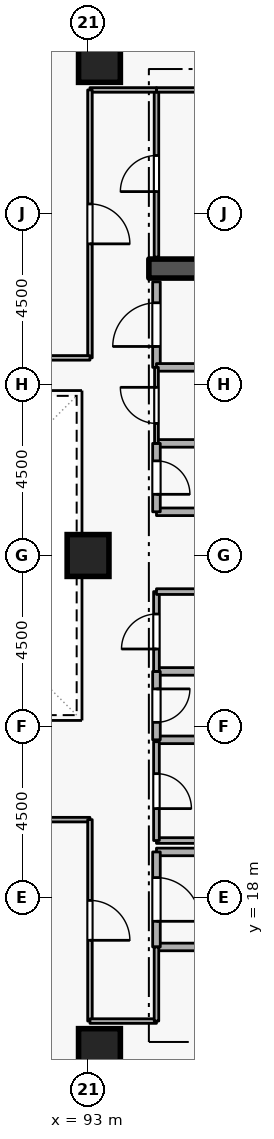
"""IFC4 building model, lengths in metres.
Left out: names, types, materials, properties, quantities, classifications, styles, units other than length and angle.
Written with IfcOpenShell. Run it as: python <this file> out.ifc"""

import sys

from ifc_helpers import new_model, si_unit, direction, frame, frame_2d, origin, origin_2d, place, context, subcontext, project, spatial, rectangle, extrude, element, fill, save


model = new_model("IFC4")
c1 = context("Model", 3, precision=1e-05, world=origin(), true_north=direction((0.0, 1.0)))
c2 = subcontext(c1, "Body", "Model", "MODEL_VIEW")
j1 = project(units=[si_unit("LENGTHUNIT", "METRE"), si_unit("PLANEANGLEUNIT", "RADIAN")], contexts=[c1])
p1 = place(None, origin())
s1 = spatial("IfcSite", under=j1, at=p1, CompositionType="ELEMENT")
p2 = place(p1, origin())
s2 = spatial("IfcBuilding", under=s1, at=p2, CompositionType="ELEMENT")
p3 = place(p2, frame((0.0, 0.0, 178.5)))
s3 = spatial("IfcBuildingStorey", under=s2, at=p3, CompositionType="ELEMENT", Elevation=178.5)
p4 = place(p3, frame((94.6, 34.55, 0.0), z_axis=(0.0, 0.0, 1.0), x_axis=(1.0, 0.0, 0.0)))
e1 = element("IfcWall", 1, at=p4, inside=s3, PredefinedType="SHEAR", context=c2, shape_type="SweptSolid", body=[
    extrude(rectangle(XDim=5.8, YDim=0.5, at=frame_2d((2.9, 0.0))), origin(), (0.0, 0.0, 1.0), 3.6),
])
for number, where, z_axis, x_axis in (
    (2, (93.3, 14.0, 0.0), (0.0, 0.0, 1.0), (1.0, 0.0, 0.0)),
    (3, (93.3, 40.0, 0.0), (0.0, 0.0, 1.0), (1.0, 0.0, 0.0)),
    (4, (93.0, 27.0, 0.0), (0.0, 0.0, 1.0), (1.0, 0.0, 0.0)),
):
    element("IfcColumn", number, at=place(p3, frame(where, z_axis=z_axis, x_axis=x_axis)), inside=s3, PredefinedType="COLUMN", context=c2, shape_type="SweptSolid", body=[
        extrude(rectangle(XDim=1.1, YDim=1.1, at=origin_2d()), origin(), (0.0, 0.0, 1.0), 3.6),
    ])
p5 = place(p3, frame((94.8, 16.7, 0.0), z_axis=(0.0, 0.0, 1.0), x_axis=(1.0, 0.0, 0.0)))
e5 = element("IfcWall", 5, at=p5, inside=s3, PredefinedType="STANDARD", context=c2, shape_type="SweptSolid", body=[
    extrude(rectangle(XDim=5.7, YDim=0.2, at=frame_2d((2.85, 0.0))), origin(), (0.0, 0.0, 1.0), 3.34),
])
p6 = place(p3, frame((97.1, 19.2, 0.0), z_axis=(0.0, 0.0, 1.0), x_axis=(-1.0, 0.0, 0.0)))
e6 = element("IfcWall", 6, at=p6, inside=s3, PredefinedType="STANDARD", context=c2, shape_type="SweptSolid", body=[
    extrude(rectangle(XDim=2.3, YDim=0.2, at=frame_2d((1.15, 0.0))), origin(), (0.0, 0.0, 1.0), 2.545),
])
p7 = place(p3, frame((94.8, 19.2, 0.0), z_axis=(0.0, 0.0, 1.0), x_axis=(0.0, -1.0, 0.0)))
e7 = element("IfcWall", 7, at=p7, inside=s3, PredefinedType="STANDARD", context=c2, shape_type="SweptSolid", body=[
    extrude(rectangle(XDim=2.5, YDim=0.2, at=frame_2d((1.25, 0.0))), origin(), (0.0, 0.0, 1.0), 3.34),
])
p8 = place(p7, frame((0.675, 0.0, 0.0)))
e8 = element("IfcOpeningElement", 8, at=p8, cuts=e7, PredefinedType="OPENING", context=c2, shape_type="SweptSolid", body=[
    extrude(rectangle(XDim=1.15, YDim=2.1, at=frame_2d((0.575, 1.05))), frame((0.0, 0.11, 0.0), z_axis=(0.0, -1.0, 0.0), x_axis=(1.0, 0.0, 0.0)), (0.0, 0.0, 1.0), 0.22),
])
for number, where, z_axis, x_axis in (
    (9, (94.8, 28.15, 0.0), (0.0, 0.0, 1.0), (1.0, 0.0, 0.0)),
    (10, (96.85, 29.95, 0.0), (0.0, 0.0, 1.0), (-1.0, 0.0, 0.0)),
):
    element("IfcWall", number, at=place(p3, frame(where, z_axis=z_axis, x_axis=x_axis)), inside=s3, PredefinedType="STANDARD", context=c2, shape_type="SweptSolid", body=[
        extrude(rectangle(XDim=2.05, YDim=0.2, at=frame_2d((1.025, 0.0))), origin(), (0.0, 0.0, 1.0), 3.34),
    ])
p9 = place(p3, frame((94.8, 29.95, 0.0), z_axis=(0.0, 0.0, 1.0), x_axis=(0.0, -1.0, 0.0)))
e11 = element("IfcWall", 11, at=p9, inside=s3, PredefinedType="STANDARD", context=c2, shape_type="SweptSolid", body=[
    extrude(rectangle(XDim=1.8, YDim=0.2, at=frame_2d((0.9, 0.0))), origin(), (0.0, 0.0, 1.0), 3.34),
])
p10 = place(p9, frame((0.46, 0.0, 0.0)))
e12 = element("IfcOpeningElement", 12, at=p10, cuts=e11, PredefinedType="OPENING", context=c2, shape_type="SweptSolid", body=[
    extrude(rectangle(XDim=0.88, YDim=2.04, at=frame_2d((0.44, 1.02))), frame((0.0, 0.11, 0.0), z_axis=(0.0, -1.0, 0.0), x_axis=(1.0, 0.0, 0.0)), (0.0, 0.0, 1.0), 0.22),
])
for number, where, z_axis, x_axis in (
    (13, (94.8, 22.15, 0.0), (0.0, 0.0, 1.0), (1.0, 0.0, 0.0)),
    (14, (96.85, 23.95, 0.0), (0.0, 0.0, 1.0), (-1.0, 0.0, 0.0)),
):
    element("IfcWall", number, at=place(p3, frame(where, z_axis=z_axis, x_axis=x_axis)), inside=s3, PredefinedType="STANDARD", context=c2, shape_type="SweptSolid", body=[
        extrude(rectangle(XDim=2.05, YDim=0.2, at=frame_2d((1.025, 0.0))), origin(), (0.0, 0.0, 1.0), 3.34),
    ])
p11 = place(p3, frame((94.8, 23.95, 0.0), z_axis=(0.0, 0.0, 1.0), x_axis=(0.0, -1.0, 0.0)))
e15 = element("IfcWall", 15, at=p11, inside=s3, PredefinedType="STANDARD", context=c2, shape_type="SweptSolid", body=[
    extrude(rectangle(XDim=1.8, YDim=0.2, at=frame_2d((0.9, 0.0))), origin(), (0.0, 0.0, 1.0), 3.34),
])
p12 = place(p11, frame((0.46, 0.0, 0.0)))
e16 = element("IfcOpeningElement", 16, at=p12, cuts=e15, PredefinedType="OPENING", context=c2, shape_type="SweptSolid", body=[
    extrude(rectangle(XDim=0.88, YDim=2.04, at=frame_2d((0.44, 1.02))), frame((0.0, 0.11, 0.0), z_axis=(0.0, -1.0, 0.0), x_axis=(1.0, 0.0, 0.0)), (0.0, 0.0, 1.0), 0.22),
])
p13 = place(p3, frame((94.8, 31.95, 0.0), z_axis=(0.0, 0.0, 1.0), x_axis=(0.0, 1.0, 0.0)))
e17 = element("IfcWall", 17, at=p13, inside=s3, PredefinedType="STANDARD", context=c2, shape_type="SweptSolid", body=[
    extrude(rectangle(XDim=2.25, YDim=0.2, at=frame_2d((1.125, 0.0))), origin(), (0.0, 0.0, 1.0), 3.34),
])
p14 = place(p13, frame((0.55, 0.0, 0.0)))
e18 = element("IfcOpeningElement", 18, at=p14, cuts=e17, PredefinedType="OPENING", context=c2, shape_type="SweptSolid", body=[
    extrude(rectangle(XDim=1.15, YDim=2.1, at=frame_2d((0.575, 1.05))), frame((0.0, 0.11, 0.0), z_axis=(0.0, -1.0, 0.0), x_axis=(1.0, 0.0, 0.0)), (0.0, 0.0, 1.0), 0.22),
])
p15 = place(p3, frame((96.85, 31.95, 0.0), z_axis=(0.0, 0.0, 1.0), x_axis=(-1.0, 0.0, 0.0)))
e19 = element("IfcWall", 19, at=p15, inside=s3, PredefinedType="STANDARD", context=c2, shape_type="SweptSolid", body=[
    extrude(rectangle(XDim=2.05, YDim=0.2, at=frame_2d((1.025, 0.0))), origin(), (0.0, 0.0, 1.0), 3.34),
])
p16 = place(p3, frame((94.8, 19.5, 0.0), z_axis=(0.0, 0.0, 1.0), x_axis=(1.0, 0.0, 0.0)))
e20 = element("IfcWall", 20, at=p16, inside=s3, PredefinedType="PARTITIONING", context=c2, shape_type="SweptSolid", body=[
    extrude(rectangle(XDim=2.05, YDim=0.15, at=frame_2d((1.025, 0.0))), origin(), (0.0, 0.0, 1.0), 2.545),
])
p17 = place(p3, frame((94.8, 22.1, 0.0), z_axis=(0.0, 0.0, 1.0), x_axis=(0.0, -1.0, 0.0)))
e21 = element("IfcWall", 21, at=p17, inside=s3, PredefinedType="PARTITIONING", context=c2, shape_type="SweptSolid", body=[
    extrude(rectangle(XDim=2.6, YDim=0.15, at=frame_2d((1.3, 0.0))), origin(), (0.0, 0.0, 1.0), 3.34),
])
p18 = place(p17, frame((0.84, 0.0, 0.0)))
e22 = element("IfcOpeningElement", 22, at=p18, cuts=e21, PredefinedType="OPENING", context=c2, shape_type="SweptSolid", body=[
    extrude(rectangle(XDim=0.92, YDim=2.08, at=frame_2d((0.46, 1.04))), frame((0.0, 0.085, 0.0), z_axis=(0.0, -1.0, 0.0), x_axis=(1.0, 0.0, 0.0)), (0.0, 0.0, 1.0), 0.17),
])
p19 = place(p3, frame((94.8, 23.95, 0.0), z_axis=(0.0, 0.0, 1.0), x_axis=(0.0, 1.0, 0.0)))
e23 = element("IfcWall", 23, at=p19, inside=s3, PredefinedType="PARTITIONING", context=c2, shape_type="SweptSolid", body=[
    extrude(rectangle(XDim=2.1, YDim=0.15, at=frame_2d((1.05, 0.0))), origin(), (0.0, 0.0, 1.0), 3.34),
])
p20 = place(p19, frame((0.59, 0.0, 0.0)))
e24 = element("IfcOpeningElement", 24, at=p20, cuts=e23, PredefinedType="OPENING", context=c2, shape_type="SweptSolid", body=[
    extrude(rectangle(XDim=0.92, YDim=2.08, at=frame_2d((0.46, 1.04))), frame((0.0, 0.085, 0.0), z_axis=(0.0, -1.0, 0.0), x_axis=(1.0, 0.0, 0.0)), (0.0, 0.0, 1.0), 0.17),
])
p21 = place(p3, frame((94.8, 26.05, 0.0), z_axis=(0.0, 0.0, 1.0), x_axis=(1.0, 0.0, 0.0)))
e25 = element("IfcWall", 25, at=p21, inside=s3, PredefinedType="PARTITIONING", context=c2, shape_type="SweptSolid", body=[
    extrude(rectangle(XDim=2.05, YDim=0.15, at=frame_2d((1.025, 0.0))), origin(), (0.0, 0.0, 1.0), 3.34),
])
p22 = place(p3, frame((94.8, 29.95, 0.0), z_axis=(0.0, 0.0, 1.0), x_axis=(0.0, 1.0, 0.0)))
e26 = element("IfcWall", 26, at=p22, inside=s3, PredefinedType="PARTITIONING", context=c2, shape_type="SweptSolid", body=[
    extrude(rectangle(XDim=2.0, YDim=0.1, at=frame_2d((1.0, 0.0))), origin(), (0.0, 0.0, 1.0), 3.34),
])
p23 = place(p22, frame((0.525, 0.0, 0.0)))
e27 = element("IfcOpeningElement", 27, at=p23, cuts=e26, PredefinedType="OPENING", context=c2, shape_type="SweptSolid", body=[
    extrude(rectangle(XDim=0.95, YDim=2.1, at=frame_2d((0.475, 1.05))), frame((0.0, 0.06, 0.0), z_axis=(0.0, -1.0, 0.0), x_axis=(1.0, 0.0, 0.0)), (0.0, 0.0, 1.0), 0.12),
])
p24 = place(p3, frame((94.8, 34.85, 0.0), z_axis=(0.0, 0.0, 1.0), x_axis=(0.0, 1.0, 0.0)))
e28 = element("IfcWall", 28, at=p24, inside=s3, PredefinedType="PARTITIONING", context=c2, shape_type="SweptSolid", body=[
    extrude(rectangle(XDim=4.4, YDim=0.12, at=frame_2d((2.2, 0.0))), origin(), (0.0, 0.0, 1.0), 3.34),
])
p25 = place(p24, frame((1.725, 0.0, 0.0)))
e29 = element("IfcOpeningElement", 29, at=p25, cuts=e28, PredefinedType="OPENING", context=c2, shape_type="SweptSolid", body=[
    extrude(rectangle(XDim=0.95, YDim=2.1, at=frame_2d((0.475, 1.05))), frame((0.0, 0.07, 0.0), z_axis=(0.0, -1.0, 0.0), x_axis=(1.0, 0.0, 0.0)), (0.0, 0.0, 1.0), 0.14),
])
p26 = place(p3, frame((94.8, 39.25, 0.0), z_axis=(0.0, 0.0, 1.0), x_axis=(1.0, 0.0, 0.0)))
e30 = element("IfcWall", 30, at=p26, inside=s3, PredefinedType="PARTITIONING", context=c2, shape_type="SweptSolid", body=[
    extrude(rectangle(XDim=5.65, YDim=0.12, at=frame_2d((2.825, 0.0))), origin(), (0.0, 0.0, 1.0), 3.34),
])
p27 = place(p3, frame((88.5, 20.05, 0.0), z_axis=(0.0, 0.0, 1.0), x_axis=(1.0, 0.0, 0.0)))
e31 = element("IfcWall", 31, at=p27, inside=s3, PredefinedType="PARTITIONING", context=c2, shape_type="SweptSolid", body=[
    extrude(rectangle(XDim=4.55, YDim=0.12, at=frame_2d((2.275, 0.0))), origin(), (0.0, 0.0, 1.0), 3.34),
])
p28 = place(p3, frame((93.05, 20.05, 0.0), z_axis=(0.0, 0.0, 1.0), x_axis=(0.0, -1.0, 0.0)))
e32 = element("IfcWall", 32, at=p28, inside=s3, PredefinedType="PARTITIONING", context=c2, shape_type="SweptSolid", body=[
    extrude(rectangle(XDim=5.3, YDim=0.12, at=frame_2d((2.65, 0.0))), origin(), (0.0, 0.0, 1.0), 3.34),
])
p29 = place(p28, frame((2.125, 0.0, 0.0)))
e33 = element("IfcOpeningElement", 33, at=p29, cuts=e32, PredefinedType="OPENING", context=c2, shape_type="SweptSolid", body=[
    extrude(rectangle(XDim=1.05, YDim=2.1, at=frame_2d((0.525, 1.05))), frame((0.0, 0.07, 0.0), z_axis=(0.0, -1.0, 0.0), x_axis=(1.0, 0.0, 0.0)), (0.0, 0.0, 1.0), 0.14),
])
p30 = place(p3, frame((93.05, 14.75, 0.0), z_axis=(0.0, 0.0, 1.0), x_axis=(1.0, 0.0, 0.0)))
e34 = element("IfcWall", 34, at=p30, inside=s3, PredefinedType="PARTITIONING", context=c2, shape_type="SweptSolid", body=[
    extrude(rectangle(XDim=1.75, YDim=0.12, at=frame_2d((0.875, 0.0))), origin(), (0.0, 0.0, 1.0), 3.34),
])
p31 = place(p3, frame((94.8, 14.75, 0.0), z_axis=(0.0, 0.0, 1.0), x_axis=(0.0, 1.0, 0.0)))
e35 = element("IfcWall", 35, at=p31, inside=s3, PredefinedType="PARTITIONING", context=c2, shape_type="SweptSolid", body=[
    extrude(rectangle(XDim=1.95, YDim=0.12, at=frame_2d((0.975, 0.0))), origin(), (0.0, 0.0, 1.0), 3.34),
])
p32 = place(p3, frame((94.8, 39.25, 0.0), z_axis=(0.0, 0.0, 1.0), x_axis=(-1.0, 0.0, 0.0)))
e36 = element("IfcWall", 36, at=p32, inside=s3, PredefinedType="PARTITIONING", context=c2, shape_type="SweptSolid", body=[
    extrude(rectangle(XDim=1.75, YDim=0.12, at=frame_2d((0.875, 0.0))), origin(), (0.0, 0.0, 1.0), 3.34),
])
p33 = place(p3, frame((93.05, 39.25, 0.0), z_axis=(0.0, 0.0, 1.0), x_axis=(0.0, -1.0, 0.0)))
e37 = element("IfcWall", 37, at=p33, inside=s3, PredefinedType="PARTITIONING", context=c2, shape_type="SweptSolid", body=[
    extrude(rectangle(XDim=7.05, YDim=0.12, at=frame_2d((3.525, 0.0))), origin(), (0.0, 0.0, 1.0), 3.34),
])
p34 = place(p33, frame((3.0, 0.0, 0.0)))
e38 = element("IfcOpeningElement", 38, at=p34, cuts=e37, PredefinedType="OPENING", context=c2, shape_type="SweptSolid", body=[
    extrude(rectangle(XDim=1.05, YDim=2.1, at=frame_2d((0.525, 1.05))), frame((0.0, 0.07, 0.0), z_axis=(0.0, -1.0, 0.0), x_axis=(1.0, 0.0, 0.0)), (0.0, 0.0, 1.0), 0.14),
])
p35 = place(p3, frame((93.05, 32.2, 0.0), z_axis=(0.0, 0.0, 1.0), x_axis=(-1.0, 0.0, 0.0)))
e39 = element("IfcWall", 39, at=p35, inside=s3, PredefinedType="PARTITIONING", context=c2, shape_type="SweptSolid", body=[
    extrude(rectangle(XDim=4.55, YDim=0.12, at=frame_2d((2.275, 0.0))), origin(), (0.0, 0.0, 1.0), 3.34),
])
p36 = place(p8, origin())
e40 = element("IfcDoor", 40, at=p36, inside=s3, OperationType="SINGLE_SWING_RIGHT", PredefinedType="DOOR", context=c2, shape_type="SweptSolid", body=[
    extrude(rectangle(XDim=1.15, YDim=2.1, at=frame_2d((0.575, 1.05))), frame((0.0, 0.025, 0.0), z_axis=(0.0, -1.0, 0.0), x_axis=(1.0, 0.0, 0.0)), (0.0, 0.0, 1.0), 0.05),
])
fill(e8, e40)
p37 = place(p10, origin())
e41 = element("IfcDoor", 41, at=p37, inside=s3, OperationType="SINGLE_SWING_RIGHT", PredefinedType="DOOR", context=c2, shape_type="SweptSolid", body=[
    extrude(rectangle(XDim=0.88, YDim=2.04, at=frame_2d((0.44, 1.02))), frame((0.0, 0.025, 0.0), z_axis=(0.0, -1.0, 0.0), x_axis=(1.0, 0.0, 0.0)), (0.0, 0.0, 1.0), 0.05),
])
fill(e12, e41)
p38 = place(p12, origin())
e42 = element("IfcDoor", 42, at=p38, inside=s3, OperationType="SINGLE_SWING_LEFT", PredefinedType="DOOR", context=c2, shape_type="SweptSolid", body=[
    extrude(rectangle(XDim=0.88, YDim=2.04, at=frame_2d((0.44, 1.02))), frame((0.0, 0.025, 0.0), z_axis=(0.0, -1.0, 0.0), x_axis=(1.0, 0.0, 0.0)), (0.0, 0.0, 1.0), 0.05),
])
fill(e16, e42)
p39 = place(p18, origin())
e43 = element("IfcDoor", 43, at=p39, inside=s3, OperationType="SINGLE_SWING_RIGHT", PredefinedType="DOOR", context=c2, shape_type="SweptSolid", body=[
    extrude(rectangle(XDim=0.92, YDim=2.08, at=frame_2d((0.46, 1.04))), frame((0.0, 0.025, 0.0), z_axis=(0.0, -1.0, 0.0), x_axis=(1.0, 0.0, 0.0)), (0.0, 0.0, 1.0), 0.05),
])
fill(e22, e43)
p40 = place(p20, origin())
e44 = element("IfcDoor", 44, at=p40, inside=s3, OperationType="SINGLE_SWING_LEFT", PredefinedType="DOOR", context=c2, shape_type="SweptSolid", body=[
    extrude(rectangle(XDim=0.92, YDim=2.08, at=frame_2d((0.46, 1.04))), frame((0.0, 0.025, 0.0), z_axis=(0.0, -1.0, 0.0), x_axis=(1.0, 0.0, 0.0)), (0.0, 0.0, 1.0), 0.05),
])
fill(e24, e44)
p41 = place(p23, origin())
e45 = element("IfcDoor", 45, at=p41, inside=s3, OperationType="SINGLE_SWING_RIGHT", PredefinedType="DOOR", context=c2, shape_type="SweptSolid", body=[
    extrude(rectangle(XDim=0.95, YDim=2.1, at=frame_2d((0.475, 1.05))), frame((0.0, 0.025, 0.0), z_axis=(0.0, -1.0, 0.0), x_axis=(1.0, 0.0, 0.0)), (0.0, 0.0, 1.0), 0.05),
])
fill(e27, e45)
p42 = place(p14, origin())
e46 = element("IfcDoor", 46, at=p42, inside=s3, OperationType="SINGLE_SWING_LEFT", PredefinedType="DOOR", context=c2, shape_type="SweptSolid", body=[
    extrude(rectangle(XDim=1.15, YDim=2.1, at=frame_2d((0.575, 1.05))), frame((0.0, 0.025, 0.0), z_axis=(0.0, -1.0, 0.0), x_axis=(1.0, 0.0, 0.0)), (0.0, 0.0, 1.0), 0.05),
])
fill(e18, e46)
p43 = place(p25, origin())
e47 = element("IfcDoor", 47, at=p43, inside=s3, OperationType="SINGLE_SWING_LEFT", PredefinedType="DOOR", context=c2, shape_type="SweptSolid", body=[
    extrude(rectangle(XDim=0.95, YDim=2.1, at=frame_2d((0.475, 1.05))), frame((0.0, 0.025, 0.0), z_axis=(0.0, -1.0, 0.0), x_axis=(1.0, 0.0, 0.0)), (0.0, 0.0, 1.0), 0.05),
])
fill(e29, e47)
p44 = place(p29, origin())
e48 = element("IfcDoor", 48, at=p44, inside=s3, OperationType="SINGLE_SWING_RIGHT", PredefinedType="DOOR", context=c2, shape_type="SweptSolid", body=[
    extrude(rectangle(XDim=1.05, YDim=2.1, at=frame_2d((0.525, 1.05))), frame((0.0, 0.025, 0.0), z_axis=(0.0, -1.0, 0.0), x_axis=(1.0, 0.0, 0.0)), (0.0, 0.0, 1.0), 0.05),
])
fill(e33, e48)
p45 = place(p34, origin())
e49 = element("IfcDoor", 49, at=p45, inside=s3, OperationType="SINGLE_SWING_RIGHT", PredefinedType="DOOR", context=c2, shape_type="SweptSolid", body=[
    extrude(rectangle(XDim=1.05, YDim=2.1, at=frame_2d((0.525, 1.05))), frame((0.0, 0.025, 0.0), z_axis=(0.0, -1.0, 0.0), x_axis=(1.0, 0.0, 0.0)), (0.0, 0.0, 1.0), 0.05),
])
fill(e38, e49)
save(model, sys.argv[1])
